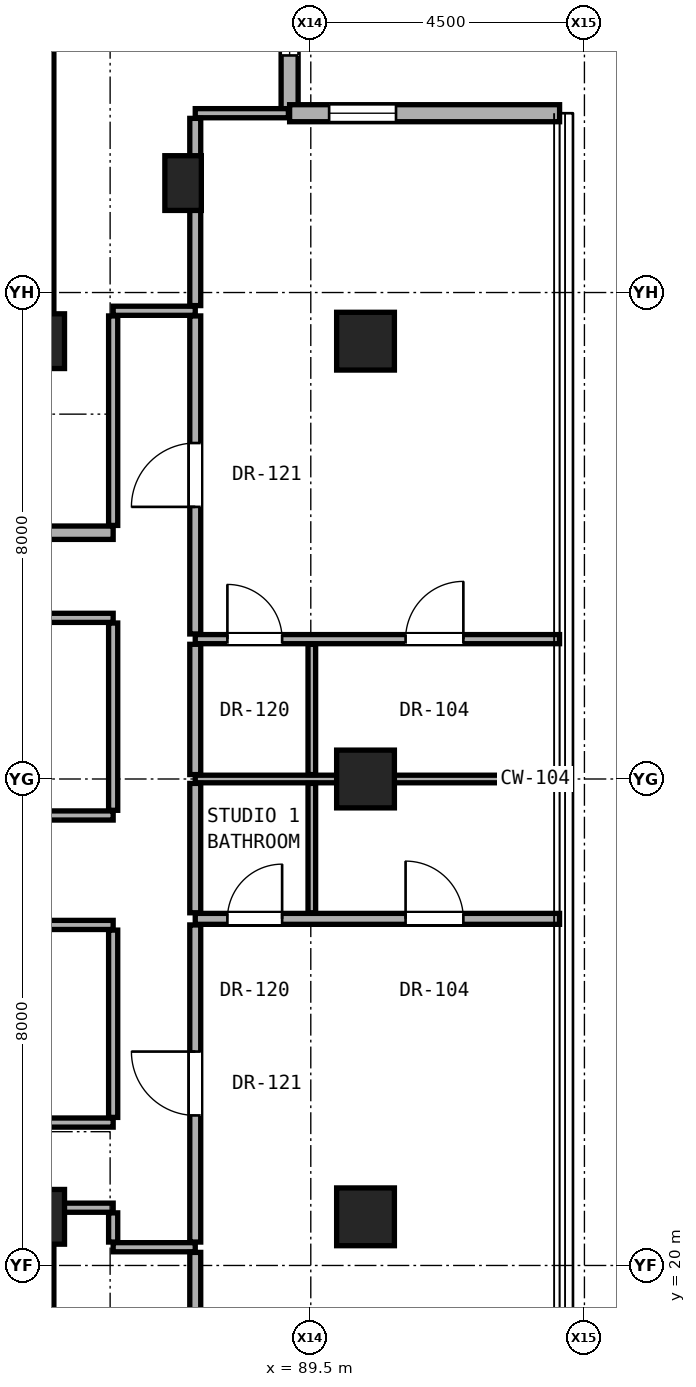
"""IFC4 building model, lengths in metres.
Left out: names, types, materials, properties, quantities, classifications, styles, units other than length and angle.
Written with IfcOpenShell. Run it as: python <this file> out.ifc"""

import sys

from ifc_helpers import new_model, si_unit, direction, frame, frame_2d, origin, origin_2d, place, context, subcontext, project, spatial, rectangle, hollow_rectangle, extrude, element, fill, save


model = new_model("IFC4")
c1 = context("Model", 3, precision=1e-05, world=origin(), true_north=direction((0.0, 1.0)))
c2 = subcontext(c1, "Body", "Model", "MODEL_VIEW")
j1 = project(units=[si_unit("LENGTHUNIT", "METRE"), si_unit("PLANEANGLEUNIT", "RADIAN")], contexts=[c1])
p1 = place(None, origin())
s1 = spatial("IfcSite", under=j1, at=p1, CompositionType="ELEMENT")
p2 = place(p1, origin())
s2 = spatial("IfcBuilding", under=s1, at=p2, CompositionType="ELEMENT")
p3 = place(p2, frame((0.0, 0.0, 193.4)))
s3 = spatial("IfcBuildingStorey", under=s2, at=p3, CompositionType="ELEMENT", Elevation=193.4)
for number, where, z_axis, x_axis in (
    (1, (85.0, 20.8, 0.0), (0.0, 0.0, 1.0), (1.0, 0.0, 0.0)),
    (2, (85.0, 35.2, 0.0), (0.0, 0.0, 1.0), (1.0, 0.0, 0.0)),
):
    element("IfcColumn", number, at=place(p3, frame(where, z_axis=z_axis, x_axis=x_axis)), inside=s3, PredefinedType="COLUMN", context=c2, shape_type="SweptSolid", body=[
        extrude(rectangle(XDim=0.9, YDim=0.9, at=origin_2d()), origin(), (0.0, 0.0, 1.0), 3.25),
    ])
for number, where, z_axis, x_axis in (
    (3, (90.4, 20.8, 0.0), (0.0, 0.0, 1.0), (1.0, 0.0, 0.0)),
    (4, (90.4, 28.0, 0.0), (0.0, 0.0, 1.0), (1.0, 0.0, 0.0)),
    (5, (90.4, 35.2, 0.0), (0.0, 0.0, 1.0), (1.0, 0.0, 0.0)),
):
    element("IfcColumn", number, at=place(p3, frame(where, z_axis=z_axis, x_axis=x_axis)), inside=s3, PredefinedType="COLUMN", context=c2, shape_type="SweptSolid", body=[
        extrude(hollow_rectangle(XDim=0.95, YDim=0.95, WallThickness=0.05, at=origin_2d()), origin(), (0.0, 0.0, 1.0), 3.25),
    ])
p4 = place(p3, frame((87.4, 37.8, 0.0), z_axis=(0.0, 0.0, 1.0), x_axis=(1.0, 0.0, 0.0)))
e6 = element("IfcColumn", 6, at=p4, inside=s3, PredefinedType="PILASTER", context=c2, shape_type="SweptSolid", body=[
    extrude(rectangle(XDim=0.6, YDim=0.9, at=origin_2d()), origin(), (0.0, 0.0, 1.0), 3.25),
])
for number, where, z_axis, x_axis in (
    (7, (85.0, 35.2, 0.0), (0.0, 0.0, 1.0), (0.0, 1.0, 0.0)),
    (8, (85.0, 15.2, 0.0), (0.0, 0.0, 1.0), (0.0, 1.0, 0.0)),
):
    element("IfcWall", number, at=place(p3, frame(where, z_axis=z_axis, x_axis=x_axis)), inside=s3, PredefinedType="SHEAR", context=c2, shape_type="SweptSolid", body=[
        extrude(rectangle(XDim=5.6, YDim=0.55, at=frame_2d((2.8, 0.0))), origin(), (0.0, 0.0, 1.0), 3.05),
    ])
p5 = place(p3, frame((89.152, 38.949, 0.0), z_axis=(0.0, 0.0, 1.0), x_axis=(0.0, 1.0, 0.0)))
e9 = element("IfcWall", 9, at=p5, inside=s3, PredefinedType="SOLIDWALL", context=c2, shape_type="SweptSolid", body=[
    extrude(rectangle(XDim=4.44, YDim=0.28, at=frame_2d((2.22, 0.0))), origin(), (0.0, 0.0, 1.0), 3.03),
])
p6 = place(p5, frame((0.95, 0.0, 0.85)))
e10 = element("IfcOpeningElement", 10, at=p6, cuts=e9, PredefinedType="OPENING", context=c2, shape_type="SweptSolid", body=[
    extrude(rectangle(XDim=1.1, YDim=2.0, at=frame_2d((0.55, 1.0))), frame((0.0, 0.15, 0.0), z_axis=(0.0, -1.0, 0.0), x_axis=(1.0, 0.0, 0.0)), (0.0, 0.0, 1.0), 0.3),
])
p7 = place(p3, frame((93.592, 38.949, 0.0), z_axis=(0.0, 0.0, 1.0), x_axis=(-1.0, 0.0, 0.0)))
e11 = element("IfcWall", 11, at=p7, inside=s3, PredefinedType="SOLIDWALL", context=c2, shape_type="SweptSolid", body=[
    extrude(rectangle(XDim=4.44, YDim=0.28, at=frame_2d((2.22, 0.0))), origin(), (0.0, 0.0, 1.0), 3.03),
])
p8 = place(p7, frame((2.69, 0.0, 0.85)))
e12 = element("IfcOpeningElement", 12, at=p8, cuts=e11, PredefinedType="OPENING", context=c2, shape_type="SweptSolid", body=[
    extrude(rectangle(XDim=1.1, YDim=2.0, at=frame_2d((0.55, 1.0))), frame((0.0, 0.15, 0.0), z_axis=(0.0, -1.0, 0.0), x_axis=(1.0, 0.0, 0.0)), (0.0, 0.0, 1.0), 0.3),
])
p9 = place(p3, frame((86.25, 20.3, 0.0), z_axis=(0.0, 0.0, 1.0), x_axis=(1.0, 0.0, 0.0)))
e13 = element("IfcWall", 13, at=p9, inside=s3, PredefinedType="PARTITIONING", context=c2, shape_type="SweptSolid", body=[
    extrude(rectangle(XDim=1.35, YDim=0.15, at=frame_2d((0.675, 0.0))), origin(), (0.0, 0.0, 1.0), 3.05),
])
p10 = place(p3, frame((85.27, 20.95, 0.0), z_axis=(0.0, 0.0, 1.0), x_axis=(1.0, 0.0, 0.0)))
e14 = element("IfcWall", 14, at=p10, inside=s3, PredefinedType="PARTITIONING", context=c2, shape_type="SweptSolid", body=[
    extrude(rectangle(XDim=0.98, YDim=0.15, at=frame_2d((0.49, 0.0))), origin(), (0.0, 0.0, 1.0), 2.442),
])
p11 = place(p3, frame((78.64, 22.35, 0.0), z_axis=(0.0, 0.0, 1.0), x_axis=(1.0, 0.0, 0.0)))
e15 = element("IfcWall", 15, at=p11, inside=s3, PredefinedType="PARTITIONING", context=c2, shape_type="SweptSolid", body=[
    extrude(rectangle(XDim=7.61, YDim=0.15, at=frame_2d((3.805, 0.0))), origin(), (0.0, 0.0, 1.0), 2.186),
])
p12 = place(p11, frame((3.33, 0.0, 0.0)))
e16 = element("IfcOpeningElement", 16, at=p12, cuts=e15, PredefinedType="OPENING", context=c2, shape_type="SweptSolid", body=[
    extrude(rectangle(XDim=0.95, YDim=2.15, at=frame_2d((0.475, 1.075))), frame((0.0, 0.085, 0.0), z_axis=(0.0, -1.0, 0.0), x_axis=(1.0, 0.0, 0.0)), (0.0, 0.0, 1.0), 0.17),
])
p13 = place(p3, frame((78.6, 25.6, 0.0), z_axis=(0.0, 0.0, 1.0), x_axis=(1.0, 0.0, 0.0)))
e17 = element("IfcWall", 17, at=p13, inside=s3, PredefinedType="PARTITIONING", context=c2, shape_type="SweptSolid", body=[
    extrude(rectangle(XDim=7.65, YDim=0.15, at=frame_2d((3.825, 0.0))), origin(), (0.0, 0.0, 1.0), 2.186),
])
p14 = place(p3, frame((87.6, 25.7, 0.0), z_axis=(0.0, 0.0, 1.0), x_axis=(1.0, 0.0, 0.0)))
e18 = element("IfcWall", 18, at=p14, inside=s3, PredefinedType="PARTITIONING", context=c2, shape_type="SweptSolid", body=[
    extrude(rectangle(XDim=5.991, YDim=0.18, at=frame_2d((2.996, 0.0))), origin(), (0.0, 0.0, 1.0), 2.269),
])
p15 = place(p14, frame((3.459, 0.0, 0.0)))
e19 = element("IfcOpeningElement", 19, at=p15, cuts=e18, PredefinedType="OPENING", context=c2, shape_type="SweptSolid", body=[
    extrude(rectangle(XDim=0.95, YDim=2.15, at=frame_2d((0.475, 1.075))), frame((0.0, 0.1, 0.0), z_axis=(0.0, -1.0, 0.0), x_axis=(1.0, 0.0, 0.0)), (0.0, 0.0, 1.0), 0.2),
])
p16 = place(p14, frame((0.529, 0.0, 0.0)))
e20 = element("IfcOpeningElement", 20, at=p16, cuts=e18, PredefinedType="OPENING", context=c2, shape_type="SweptSolid", body=[
    extrude(rectangle(XDim=0.9, YDim=2.1, at=frame_2d((0.45, 1.05))), frame((0.0, 0.1, 0.0), z_axis=(0.0, -1.0, 0.0), x_axis=(1.0, 0.0, 0.0)), (0.0, 0.0, 1.0), 0.2),
])
p17 = place(p3, frame((78.6, 27.4, 0.0), z_axis=(0.0, 0.0, 1.0), x_axis=(1.0, 0.0, 0.0)))
e21 = element("IfcWall", 21, at=p17, inside=s3, PredefinedType="PARTITIONING", context=c2, shape_type="SweptSolid", body=[
    extrude(rectangle(XDim=7.65, YDim=0.15, at=frame_2d((3.825, 0.0))), origin(), (0.0, 0.0, 1.0), 2.186),
])
p18 = place(p3, frame((87.6, 28.0, 0.0), z_axis=(0.0, 0.0, 1.0), x_axis=(1.0, 0.0, 0.0)))
e22 = element("IfcWall", 22, at=p18, inside=s3, PredefinedType="PARTITIONING", context=c2, shape_type="SweptSolid", body=[
    extrude(rectangle(XDim=5.991, YDim=0.125, at=frame_2d((2.996, 0.0))), origin(), (0.0, 0.0, 1.0), 2.269),
])
p19 = place(p3, frame((87.6, 30.3, 0.0), z_axis=(0.0, 0.0, 1.0), x_axis=(1.0, 0.0, 0.0)))
e23 = element("IfcWall", 23, at=p19, inside=s3, PredefinedType="PARTITIONING", context=c2, shape_type="SweptSolid", body=[
    extrude(rectangle(XDim=5.991, YDim=0.15, at=frame_2d((2.996, 0.0))), origin(), (0.0, 0.0, 1.0), 2.269),
])
p20 = place(p19, frame((3.459, 0.0, 0.0)))
e24 = element("IfcOpeningElement", 24, at=p20, cuts=e23, PredefinedType="OPENING", context=c2, shape_type="SweptSolid", body=[
    extrude(rectangle(XDim=0.95, YDim=2.15, at=frame_2d((0.475, 1.075))), frame((0.0, 0.085, 0.0), z_axis=(0.0, -1.0, 0.0), x_axis=(1.0, 0.0, 0.0)), (0.0, 0.0, 1.0), 0.17),
])
p21 = place(p19, frame((0.529, 0.0, 0.0)))
e25 = element("IfcOpeningElement", 25, at=p21, cuts=e23, PredefinedType="OPENING", context=c2, shape_type="SweptSolid", body=[
    extrude(rectangle(XDim=0.9, YDim=2.1, at=frame_2d((0.45, 1.05))), frame((0.0, 0.085, 0.0), z_axis=(0.0, -1.0, 0.0), x_axis=(1.0, 0.0, 0.0)), (0.0, 0.0, 1.0), 0.17),
])
p22 = place(p3, frame((78.64, 30.65, 0.0), z_axis=(0.0, 0.0, 1.0), x_axis=(1.0, 0.0, 0.0)))
e26 = element("IfcWall", 26, at=p22, inside=s3, PredefinedType="PARTITIONING", context=c2, shape_type="SweptSolid", body=[
    extrude(rectangle(XDim=7.61, YDim=0.15, at=frame_2d((3.805, 0.0))), origin(), (0.0, 0.0, 1.0), 2.186),
])
p23 = place(p22, frame((3.33, 0.0, 0.0)))
e27 = element("IfcOpeningElement", 27, at=p23, cuts=e26, PredefinedType="OPENING", context=c2, shape_type="SweptSolid", body=[
    extrude(rectangle(XDim=0.95, YDim=2.15, at=frame_2d((0.475, 1.075))), frame((0.0, 0.085, 0.0), z_axis=(0.0, -1.0, 0.0), x_axis=(1.0, 0.0, 0.0)), (0.0, 0.0, 1.0), 0.17),
])
p24 = place(p3, frame((71.55, 32.05, 0.0), z_axis=(0.0, 0.0, 1.0), x_axis=(1.0, 0.0, 0.0)))
e28 = element("IfcWall", 28, at=p24, inside=s3, PredefinedType="SOLIDWALL", context=c2, shape_type="SweptSolid", body=[
    extrude(rectangle(XDim=14.7, YDim=0.22, at=frame_2d((7.35, 0.0))), origin(), (0.0, 0.0, 1.0), 2.186),
])
p25 = place(p24, frame((6.065, 0.0, 0.0)))
e29 = element("IfcOpeningElement", 29, at=p25, cuts=e28, PredefinedType="OPENING", context=c2, shape_type="SweptSolid", body=[
    extrude(rectangle(XDim=0.85, YDim=2.01, at=frame_2d((0.425, 1.005))), frame((0.0, 0.12, 0.0), z_axis=(0.0, -1.0, 0.0), x_axis=(1.0, 0.0, 0.0)), (0.0, 0.0, 1.0), 0.24),
])
p26 = place(p24, frame((10.535, 0.0, 0.0)))
e30 = element("IfcOpeningElement", 30, at=p26, cuts=e28, PredefinedType="OPENING", context=c2, shape_type="SweptSolid", body=[
    extrude(rectangle(XDim=0.95, YDim=2.15, at=frame_2d((0.475, 1.075))), frame((0.0, 0.12, 0.0), z_axis=(0.0, -1.0, 0.0), x_axis=(1.0, 0.0, 0.0)), (0.0, 0.0, 1.0), 0.24),
])
p27 = place(p24, frame((1.65, 0.0, 0.0)))
e31 = element("IfcOpeningElement", 31, at=p27, cuts=e28, PredefinedType="OPENING", context=c2, shape_type="SweptSolid", body=[
    extrude(rectangle(XDim=0.85, YDim=2.01, at=frame_2d((0.425, 1.005))), frame((0.0, 0.12, 0.0), z_axis=(0.0, -1.0, 0.0), x_axis=(1.0, 0.0, 0.0)), (0.0, 0.0, 1.0), 0.24),
])
p28 = place(p3, frame((86.25, 35.7, 0.0), z_axis=(0.0, 0.0, 1.0), x_axis=(1.0, 0.0, 0.0)))
e32 = element("IfcWall", 32, at=p28, inside=s3, PredefinedType="PARTITIONING", context=c2, shape_type="SweptSolid", body=[
    extrude(rectangle(XDim=1.35, YDim=0.15, at=frame_2d((0.675, 0.0))), origin(), (0.0, 0.0, 1.0), 3.05),
])
p29 = place(p3, frame((87.6, 38.949, 0.0), z_axis=(0.0, 0.0, 1.0), x_axis=(1.0, 0.0, 0.0)))
e33 = element("IfcWall", 33, at=p29, inside=s3, PredefinedType="PARTITIONING", context=c2, shape_type="SweptSolid", body=[
    extrude(rectangle(XDim=1.532, YDim=0.15, at=frame_2d((0.766, 0.0))), origin(), (0.0, 0.0, 1.0), 3.05),
])
p30 = place(p3, frame((86.25, 20.385, 0.0), z_axis=(0.0, 0.0, 1.0), x_axis=(0.0, 1.0, 0.0)))
e34 = element("IfcWall", 34, at=p30, inside=s3, PredefinedType="PARTITIONING", context=c2, shape_type="SweptSolid", body=[
    extrude(rectangle(XDim=0.48, YDim=0.15, at=frame_2d((0.24, 0.0))), origin(), (0.0, 0.0, 1.0), 2.442),
])
p31 = place(p3, frame((86.25, 22.435, 0.0), z_axis=(0.0, 0.0, 1.0), x_axis=(0.0, 1.0, 0.0)))
e35 = element("IfcWall", 35, at=p31, inside=s3, PredefinedType="PARTITIONING", context=c2, shape_type="SweptSolid", body=[
    extrude(rectangle(XDim=3.08, YDim=0.15, at=frame_2d((1.54, 0.0))), origin(), (0.0, 0.0, 1.0), 3.05),
])
p32 = place(p3, frame((86.25, 27.485, 0.0), z_axis=(0.0, 0.0, 1.0), x_axis=(0.0, 1.0, 0.0)))
e36 = element("IfcWall", 36, at=p32, inside=s3, PredefinedType="PARTITIONING", context=c2, shape_type="SweptSolid", body=[
    extrude(rectangle(XDim=3.08, YDim=0.15, at=frame_2d((1.54, 0.0))), origin(), (0.0, 0.0, 1.0), 2.346),
])
p33 = place(p3, frame((86.25, 32.17, 0.0), z_axis=(0.0, 0.0, 1.0), x_axis=(0.0, 1.0, 0.0)))
e37 = element("IfcWall", 37, at=p33, inside=s3, PredefinedType="PARTITIONING", context=c2, shape_type="SweptSolid", body=[
    extrude(rectangle(XDim=3.445, YDim=0.15, at=frame_2d((1.723, 0.0))), origin(), (0.0, 0.0, 1.0), 2.442),
])
p34 = place(p3, frame((87.6, 17.151, 0.0), z_axis=(0.0, 0.0, 1.0), x_axis=(0.0, 1.0, 0.0)))
e38 = element("IfcWall", 38, at=p34, inside=s3, PredefinedType="PARTITIONING", context=c2, shape_type="SweptSolid", body=[
    extrude(rectangle(XDim=3.064, YDim=0.18, at=frame_2d((1.532, 0.0))), origin(), (0.0, 0.0, 1.0), 2.493),
])
p35 = place(p3, frame((87.6, 20.385, 0.0), z_axis=(0.0, 0.0, 1.0), x_axis=(0.0, 1.0, 0.0)))
e39 = element("IfcWall", 39, at=p35, inside=s3, PredefinedType="PARTITIONING", context=c2, shape_type="SweptSolid", body=[
    extrude(rectangle(XDim=5.215, YDim=0.18, at=frame_2d((2.607, 0.0))), origin(), (0.0, 0.0, 1.0), 2.442),
])
p36 = place(p35, frame((2.083, 0.0, 0.0)))
e40 = element("IfcOpeningElement", 40, at=p36, cuts=e39, PredefinedType="OPENING", context=c2, shape_type="SweptSolid", body=[
    extrude(rectangle(XDim=1.05, YDim=2.2, at=frame_2d((0.525, 1.1))), frame((0.0, 0.1, 0.0), z_axis=(0.0, -1.0, 0.0), x_axis=(1.0, 0.0, 0.0)), (0.0, 0.0, 1.0), 0.2),
])
p37 = place(p3, frame((87.6, 25.8, 0.0), z_axis=(0.0, 0.0, 1.0), x_axis=(0.0, 1.0, 0.0)))
e41 = element("IfcWall", 41, at=p37, inside=s3, PredefinedType="PARTITIONING", context=c2, shape_type="SweptSolid", body=[
    extrude(rectangle(XDim=2.127, YDim=0.18, at=frame_2d((1.064, 0.0))), origin(), (0.0, 0.0, 1.0), 2.346),
])
p38 = place(p3, frame((87.6, 28.073, 0.0), z_axis=(0.0, 0.0, 1.0), x_axis=(0.0, 1.0, 0.0)))
e42 = element("IfcWall", 42, at=p38, inside=s3, PredefinedType="PARTITIONING", context=c2, shape_type="SweptSolid", body=[
    extrude(rectangle(XDim=2.143, YDim=0.18, at=frame_2d((1.071, 0.0))), origin(), (0.0, 0.0, 1.0), 2.346),
])
p39 = place(p3, frame((87.6, 30.385, 0.0), z_axis=(0.0, 0.0, 1.0), x_axis=(0.0, 1.0, 0.0)))
e43 = element("IfcWall", 43, at=p39, inside=s3, PredefinedType="PARTITIONING", context=c2, shape_type="SweptSolid", body=[
    extrude(rectangle(XDim=5.23, YDim=0.18, at=frame_2d((2.615, 0.0))), origin(), (0.0, 0.0, 1.0), 2.442),
])
p40 = place(p39, frame((2.09, 0.0, 0.0)))
e44 = element("IfcOpeningElement", 44, at=p40, cuts=e43, PredefinedType="OPENING", context=c2, shape_type="SweptSolid", body=[
    extrude(rectangle(XDim=1.05, YDim=2.2, at=frame_2d((0.525, 1.1))), frame((0.0, 0.1, 0.0), z_axis=(0.0, -1.0, 0.0), x_axis=(1.0, 0.0, 0.0)), (0.0, 0.0, 1.0), 0.2),
])
p41 = place(p3, frame((87.6, 35.785, 0.0), z_axis=(0.0, 0.0, 1.0), x_axis=(0.0, 1.0, 0.0)))
e45 = element("IfcWall", 45, at=p41, inside=s3, PredefinedType="PARTITIONING", context=c2, shape_type="SweptSolid", body=[
    extrude(rectangle(XDim=3.079, YDim=0.18, at=frame_2d((1.54, 0.0))), origin(), (0.0, 0.0, 1.0), 2.493),
])
p42 = place(p3, frame((89.517, 25.8, 0.0), z_axis=(0.0, 0.0, 1.0), x_axis=(0.0, 1.0, 0.0)))
e46 = element("IfcWall", 46, at=p42, inside=s3, PredefinedType="PARTITIONING", context=c2, shape_type="SweptSolid", body=[
    extrude(rectangle(XDim=2.127, YDim=0.125, at=frame_2d((1.064, 0.0))), origin(), (0.0, 0.0, 1.0), 2.346),
])
p43 = place(p3, frame((89.517, 28.073, 0.0), z_axis=(0.0, 0.0, 1.0), x_axis=(0.0, 1.0, 0.0)))
e47 = element("IfcWall", 47, at=p43, inside=s3, PredefinedType="PARTITIONING", context=c2, shape_type="SweptSolid", body=[
    extrude(rectangle(XDim=2.143, YDim=0.125, at=frame_2d((1.071, 0.0))), origin(), (0.0, 0.0, 1.0), 2.346),
])
p44 = place(p6, origin())
e48 = element("IfcWindow", 48, at=p44, inside=s3, PartitioningType="SINGLE_PANEL", PredefinedType="WINDOW", context=c2, shape_type="SweptSolid", body=[
    extrude(rectangle(XDim=1.1, YDim=2.0, at=frame_2d((0.55, 1.0))), frame((0.0, 0.03, 0.0), z_axis=(0.0, -1.0, 0.0), x_axis=(1.0, 0.0, 0.0)), (0.0, 0.0, 1.0), 0.06),
])
fill(e10, e48)
p45 = place(p8, origin())
e49 = element("IfcWindow", 49, at=p45, inside=s3, PartitioningType="SINGLE_PANEL", PredefinedType="WINDOW", context=c2, shape_type="SweptSolid", body=[
    extrude(rectangle(XDim=1.1, YDim=2.0, at=frame_2d((0.55, 1.0))), frame((0.0, 0.03, 0.0), z_axis=(0.0, -1.0, 0.0), x_axis=(1.0, 0.0, 0.0)), (0.0, 0.0, 1.0), 0.06),
])
fill(e12, e49)
p46 = place(p36, origin())
e50 = element("IfcDoor", 50, at=p46, inside=s3, OperationType="SINGLE_SWING_RIGHT", PredefinedType="DOOR", context=c2, shape_type="SweptSolid", body=[
    extrude(rectangle(XDim=1.05, YDim=2.2, at=frame_2d((0.525, 1.1))), frame((0.0, 0.025, 0.0), z_axis=(0.0, -1.0, 0.0), x_axis=(1.0, 0.0, 0.0)), (0.0, 0.0, 1.0), 0.05),
])
fill(e40, e50)
p47 = place(p15, origin())
e51 = element("IfcDoor", 51, at=p47, inside=s3, OperationType="SINGLE_SWING_LEFT", PredefinedType="DOOR", context=c2, shape_type="SweptSolid", body=[
    extrude(rectangle(XDim=0.95, YDim=2.15, at=frame_2d((0.475, 1.075))), frame((0.0, 0.025, 0.0), z_axis=(0.0, -1.0, 0.0), x_axis=(1.0, 0.0, 0.0)), (0.0, 0.0, 1.0), 0.05),
])
fill(e19, e51)
p48 = place(p16, origin())
e52 = element("IfcDoor", 52, at=p48, inside=s3, OperationType="SINGLE_SWING_RIGHT", PredefinedType="DOOR", context=c2, shape_type="SweptSolid", body=[
    extrude(rectangle(XDim=0.9, YDim=2.1, at=frame_2d((0.45, 1.05))), frame((0.0, 0.025, 0.0), z_axis=(0.0, -1.0, 0.0), x_axis=(1.0, 0.0, 0.0)), (0.0, 0.0, 1.0), 0.05),
])
fill(e20, e52)
p49 = place(p40, origin())
e53 = element("IfcDoor", 53, at=p49, inside=s3, OperationType="SINGLE_SWING_LEFT", PredefinedType="DOOR", context=c2, shape_type="SweptSolid", body=[
    extrude(rectangle(XDim=1.05, YDim=2.2, at=frame_2d((0.525, 1.1))), frame((0.0, 0.025, 0.0), z_axis=(0.0, -1.0, 0.0), x_axis=(1.0, 0.0, 0.0)), (0.0, 0.0, 1.0), 0.05),
])
fill(e44, e53)
p50 = place(p20, origin())
e54 = element("IfcDoor", 54, at=p50, inside=s3, OperationType="SINGLE_SWING_RIGHT", PredefinedType="DOOR", context=c2, shape_type="SweptSolid", body=[
    extrude(rectangle(XDim=0.95, YDim=2.15, at=frame_2d((0.475, 1.075))), frame((0.0, 0.025, 0.0), z_axis=(0.0, -1.0, 0.0), x_axis=(1.0, 0.0, 0.0)), (0.0, 0.0, 1.0), 0.05),
])
fill(e24, e54)
p51 = place(p21, origin())
e55 = element("IfcDoor", 55, at=p51, inside=s3, OperationType="SINGLE_SWING_LEFT", PredefinedType="DOOR", context=c2, shape_type="SweptSolid", body=[
    extrude(rectangle(XDim=0.9, YDim=2.1, at=frame_2d((0.45, 1.05))), frame((0.0, 0.025, 0.0), z_axis=(0.0, -1.0, 0.0), x_axis=(1.0, 0.0, 0.0)), (0.0, 0.0, 1.0), 0.05),
])
fill(e25, e55)
save(model, sys.argv[1])
